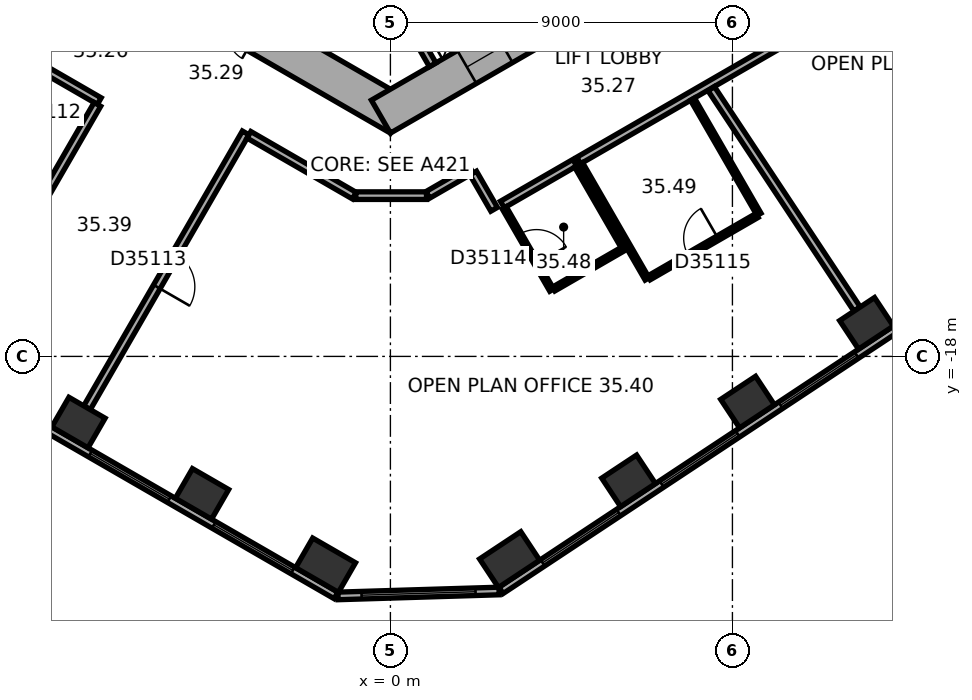
"""IFC4 building model, lengths in metres.
Left out: names, types, materials, properties, quantities, classifications, styles, units other than length and angle.
Written with IfcOpenShell. Run it as: python <this file> out.ifc"""

import sys

from ifc_helpers import new_model, si_unit, direction, frame, frame_2d, origin, origin_2d, place, context, subcontext, project, spatial, rectangle, extrude, element, fill, save


model = new_model("IFC4")
c1 = context("Model", 3, precision=1e-05, world=origin(), true_north=direction((0.0, 1.0)))
c2 = subcontext(c1, "Body", "Model", "MODEL_VIEW")
j1 = project(units=[si_unit("LENGTHUNIT", "METRE"), si_unit("PLANEANGLEUNIT", "RADIAN")], contexts=[c1])
p1 = place(None, origin())
s1 = spatial("IfcSite", under=j1, at=p1, CompositionType="ELEMENT")
p2 = place(p1, origin())
s2 = spatial("IfcBuilding", under=s1, at=p2, CompositionType="ELEMENT")
p3 = place(p2, frame((0.0, 0.0, 146.6)))
s3 = spatial("IfcBuildingStorey", under=s2, at=p3, CompositionType="ELEMENT", Elevation=146.6)
for number, where, z_axis, x_axis in (
    (1, (-8.208, -19.74, 0.0), (0.0, 0.0, 1.0), (0.866, -0.5, 0.0)),
    (2, (-4.958, -21.617, 0.0), (0.0, 0.0, 1.0), (0.866, -0.5, 0.0)),
):
    element("IfcColumn", number, at=place(p3, frame(where, z_axis=z_axis, x_axis=x_axis)), inside=s3, PredefinedType="COLUMN", context=c2, shape_type="SweptSolid", body=[
        extrude(rectangle(XDim=1.1, YDim=0.9, at=origin_2d()), origin(), (0.0, 0.0, 1.0), 3.7),
    ])
for number, where, z_axis, x_axis in (
    (3, (-1.706, -23.494, 0.0), (0.0, 0.0, 1.0), (0.866, -0.5, 0.0)),
    (4, (3.137, -23.346, 0.0), (0.0, 0.0, 1.0), (0.834, 0.552, 0.0)),
):
    element("IfcColumn", number, at=place(p3, frame(where, z_axis=z_axis, x_axis=x_axis)), inside=s3, PredefinedType="COLUMN", context=c2, shape_type="SweptSolid", body=[
        extrude(rectangle(XDim=1.3, YDim=0.9, at=origin_2d()), origin(), (0.0, 0.0, 1.0), 3.7),
    ])
for number, where, z_axis, x_axis in (
    (5, (6.268, -21.274, 0.0), (0.0, 0.0, 1.0), (0.834, 0.552, 0.0)),
    (6, (9.398, -19.202, 0.0), (0.0, 0.0, 1.0), (0.834, 0.552, 0.0)),
    (7, (12.529, -17.13, 0.0), (0.0, 0.0, 1.0), (0.834, 0.552, 0.0)),
):
    element("IfcColumn", number, at=place(p3, frame(where, z_axis=z_axis, x_axis=x_axis)), inside=s3, PredefinedType="COLUMN", context=c2, shape_type="SweptSolid", body=[
        extrude(rectangle(XDim=1.1, YDim=0.9, at=origin_2d()), origin(), (0.0, 0.0, 1.0), 3.7),
    ])
p4 = place(p3, frame((-10.25, -5.629, 0.0), z_axis=(0.0, 0.0, 1.0), x_axis=(0.866022616891, -0.50000482701, 0.0)))
e8 = element("IfcWall", 8, at=p4, inside=s3, PredefinedType="SHEAR", context=c2, shape_type="SweptSolid", body=[
    extrude(rectangle(XDim=12.125, YDim=1.0, at=frame_2d((6.062, 0.0))), origin(), (0.0, 0.0, 1.0), 3.7),
])
p5 = place(p4, frame((6.262, 0.0, 0.0)))
e9 = element("IfcOpeningElement", 9, at=p5, cuts=e8, PredefinedType="OPENING", context=c2, shape_type="SweptSolid", body=[
    extrude(rectangle(XDim=1.5, YDim=2.1, at=frame_2d((0.75, 1.05))), frame((0.0, 0.51, 0.0), z_axis=(0.0, -1.0, 0.0), x_axis=(1.0, 0.0, 0.0)), (0.0, 0.0, 1.0), 1.02),
])
p6 = place(p4, frame((1.712, 0.0, 0.0)))
e10 = element("IfcOpeningElement", 10, at=p6, cuts=e8, PredefinedType="OPENING", context=c2, shape_type="SweptSolid", body=[
    extrude(rectangle(XDim=1.1, YDim=2.1, at=frame_2d((0.55, 1.05))), frame((0.0, 0.51, 0.0), z_axis=(0.0, -1.0, 0.0), x_axis=(1.0, 0.0, 0.0)), (0.0, 0.0, 1.0), 1.02),
])
p7 = place(p4, frame((4.312, 0.0, 0.0)))
e11 = element("IfcOpeningElement", 11, at=p7, cuts=e8, PredefinedType="OPENING", context=c2, shape_type="SweptSolid", body=[
    extrude(rectangle(XDim=1.1, YDim=2.1, at=frame_2d((0.55, 1.05))), frame((0.0, 0.51, 0.0), z_axis=(0.0, -1.0, 0.0), x_axis=(1.0, 0.0, 0.0)), (0.0, 0.0, 1.0), 1.02),
])
p8 = place(p3, frame((-0.25, -11.691, 0.0), z_axis=(0.0, 0.0, 1.0), x_axis=(0.866022616891, 0.50000482701, 0.0)))
e12 = element("IfcWall", 12, at=p8, inside=s3, PredefinedType="SHEAR", context=c2, shape_type="SweptSolid", body=[
    extrude(rectangle(XDim=12.125, YDim=1.0, at=frame_2d((6.062, 0.0))), origin(), (0.0, 0.0, 1.0), 3.7),
])
p9 = place(p8, frame((2.612, 0.0, 0.0)))
e13 = element("IfcOpeningElement", 13, at=p9, cuts=e12, PredefinedType="OPENING", context=c2, shape_type="SweptSolid", body=[
    extrude(rectangle(XDim=1.1, YDim=2.1, at=frame_2d((0.55, 1.05))), frame((0.0, 0.51, 0.0), z_axis=(0.0, -1.0, 0.0), x_axis=(1.0, 0.0, 0.0)), (0.0, 0.0, 1.0), 1.02),
])
p10 = place(p8, frame((5.212, 0.0, 0.0)))
e14 = element("IfcOpeningElement", 14, at=p10, cuts=e12, PredefinedType="OPENING", context=c2, shape_type="SweptSolid", body=[
    extrude(rectangle(XDim=1.1, YDim=2.1, at=frame_2d((0.55, 1.05))), frame((0.0, 0.51, 0.0), z_axis=(0.0, -1.0, 0.0), x_axis=(1.0, 0.0, 0.0)), (0.0, 0.0, 1.0), 1.02),
])
p11 = place(p8, frame((7.812, 0.0, 0.0)))
e15 = element("IfcOpeningElement", 15, at=p11, cuts=e12, PredefinedType="OPENING", context=c2, shape_type="SweptSolid", body=[
    extrude(rectangle(XDim=1.1, YDim=2.1, at=frame_2d((0.55, 1.05))), frame((0.0, 0.51, 0.0), z_axis=(0.0, -1.0, 0.0), x_axis=(1.0, 0.0, 0.0)), (0.0, 0.0, 1.0), 1.02),
])
p12 = place(p3, frame((-18.789, -14.267, 0.0), z_axis=(0.0, 0.0, 1.0), x_axis=(0.866023315909, -0.500003616288, 0.0)))
e16 = element("IfcWall", 16, at=p12, inside=s3, PredefinedType="STANDARD", context=c2, shape_type="SweptSolid", body=[
    extrude(rectangle(XDim=20.044, YDim=0.2, at=frame_2d((10.022, 0.0))), origin(), (0.0, 0.0, 1.0), 3.7),
])
p13 = place(p12, frame((1.314, 0.0, 0.9)))
e17 = element("IfcOpeningElement", 17, at=p13, cuts=e16, PredefinedType="OPENING", context=c2, shape_type="SweptSolid", body=[
    extrude(rectangle(XDim=2.4, YDim=2.0, at=frame_2d((1.2, 1.0))), frame((0.0, 0.11, 0.0), z_axis=(0.0, -1.0, 0.0), x_axis=(1.0, 0.0, 0.0)), (0.0, 0.0, 1.0), 0.22),
])
p14 = place(p12, frame((5.069, 0.0, 0.9)))
e18 = element("IfcOpeningElement", 18, at=p14, cuts=e16, PredefinedType="OPENING", context=c2, shape_type="SweptSolid", body=[
    extrude(rectangle(XDim=2.4, YDim=2.0, at=frame_2d((1.2, 1.0))), frame((0.0, 0.11, 0.0), z_axis=(0.0, -1.0, 0.0), x_axis=(1.0, 0.0, 0.0)), (0.0, 0.0, 1.0), 0.22),
])
p15 = place(p12, frame((8.823, 0.0, 0.9)))
e19 = element("IfcOpeningElement", 19, at=p15, cuts=e16, PredefinedType="OPENING", context=c2, shape_type="SweptSolid", body=[
    extrude(rectangle(XDim=2.4, YDim=2.0, at=frame_2d((1.2, 1.0))), frame((0.0, 0.11, 0.0), z_axis=(0.0, -1.0, 0.0), x_axis=(1.0, 0.0, 0.0)), (0.0, 0.0, 1.0), 0.22),
])
p16 = place(p12, frame((12.577, 0.0, 0.9)))
e20 = element("IfcOpeningElement", 20, at=p16, cuts=e16, PredefinedType="OPENING", context=c2, shape_type="SweptSolid", body=[
    extrude(rectangle(XDim=2.4, YDim=2.0, at=frame_2d((1.2, 1.0))), frame((0.0, 0.11, 0.0), z_axis=(0.0, -1.0, 0.0), x_axis=(1.0, 0.0, 0.0)), (0.0, 0.0, 1.0), 0.22),
])
p17 = place(p12, frame((16.331, 0.0, 0.9)))
e21 = element("IfcOpeningElement", 21, at=p17, cuts=e16, PredefinedType="OPENING", context=c2, shape_type="SweptSolid", body=[
    extrude(rectangle(XDim=2.4, YDim=2.0, at=frame_2d((1.2, 1.0))), frame((0.0, 0.11, 0.0), z_axis=(0.0, -1.0, 0.0), x_axis=(1.0, 0.0, 0.0)), (0.0, 0.0, 1.0), 0.22),
])
p18 = place(p3, frame((-1.378, -24.302, 0.0), z_axis=(0.0, 0.0, 1.0), x_axis=(0.999533857267, 0.030529791629, 0.0)))
e22 = element("IfcWall", 22, at=p18, inside=s3, PredefinedType="STANDARD", context=c2, shape_type="SweptSolid", body=[
    extrude(rectangle(XDim=4.238, YDim=0.2, at=frame_2d((2.119, 0.0))), origin(), (0.0, 0.0, 1.0), 3.7),
])
p19 = place(p18, frame((0.619, 0.0, 0.9)))
e23 = element("IfcOpeningElement", 23, at=p19, cuts=e22, PredefinedType="OPENING", context=c2, shape_type="SweptSolid", body=[
    extrude(rectangle(XDim=3.0, YDim=2.0, at=frame_2d((1.5, 1.0))), frame((0.0, 0.11, 0.0), z_axis=(0.0, -1.0, 0.0), x_axis=(1.0, 0.0, 0.0)), (0.0, 0.0, 1.0), 0.22),
])
p20 = place(p3, frame((2.911, -24.156, 0.0), z_axis=(0.0, 0.0, 1.0), x_axis=(0.833882163564, 0.551942512668, 0.0)))
e24 = element("IfcWall", 24, at=p20, inside=s3, PredefinedType="STANDARD", context=c2, shape_type="SweptSolid", body=[
    extrude(rectangle(XDim=20.044, YDim=0.2, at=frame_2d((10.022, 0.0))), origin(), (0.0, 0.0, 1.0), 3.7),
])
p21 = place(p20, frame((1.313, 0.0, 0.9)))
e25 = element("IfcOpeningElement", 25, at=p21, cuts=e24, PredefinedType="OPENING", context=c2, shape_type="SweptSolid", body=[
    extrude(rectangle(XDim=2.4, YDim=2.0, at=frame_2d((1.2, 1.0))), frame((0.0, 0.11, 0.0), z_axis=(0.0, -1.0, 0.0), x_axis=(1.0, 0.0, 0.0)), (0.0, 0.0, 1.0), 0.22),
])
p22 = place(p20, frame((5.067, 0.0, 0.9)))
e26 = element("IfcOpeningElement", 26, at=p22, cuts=e24, PredefinedType="OPENING", context=c2, shape_type="SweptSolid", body=[
    extrude(rectangle(XDim=2.4, YDim=2.0, at=frame_2d((1.2, 1.0))), frame((0.0, 0.11, 0.0), z_axis=(0.0, -1.0, 0.0), x_axis=(1.0, 0.0, 0.0)), (0.0, 0.0, 1.0), 0.22),
])
p23 = place(p20, frame((8.821, 0.0, 0.9)))
e27 = element("IfcOpeningElement", 27, at=p23, cuts=e24, PredefinedType="OPENING", context=c2, shape_type="SweptSolid", body=[
    extrude(rectangle(XDim=2.4, YDim=2.0, at=frame_2d((1.2, 1.0))), frame((0.0, 0.11, 0.0), z_axis=(0.0, -1.0, 0.0), x_axis=(1.0, 0.0, 0.0)), (0.0, 0.0, 1.0), 0.22),
])
p24 = place(p20, frame((12.575, 0.0, 0.9)))
e28 = element("IfcOpeningElement", 28, at=p24, cuts=e24, PredefinedType="OPENING", context=c2, shape_type="SweptSolid", body=[
    extrude(rectangle(XDim=2.4, YDim=2.0, at=frame_2d((1.2, 1.0))), frame((0.0, 0.11, 0.0), z_axis=(0.0, -1.0, 0.0), x_axis=(1.0, 0.0, 0.0)), (0.0, 0.0, 1.0), 0.22),
])
p25 = place(p20, frame((16.329, 0.0, 0.9)))
e29 = element("IfcOpeningElement", 29, at=p25, cuts=e24, PredefinedType="OPENING", context=c2, shape_type="SweptSolid", body=[
    extrude(rectangle(XDim=2.4, YDim=2.0, at=frame_2d((1.2, 1.0))), frame((0.0, 0.11, 0.0), z_axis=(0.0, -1.0, 0.0), x_axis=(1.0, 0.0, 0.0)), (0.0, 0.0, 1.0), 0.22),
])
p26 = place(p3, frame((0.013, -8.422, 0.0), z_axis=(0.0, 0.0, 1.0), x_axis=(0.500077893725, -0.86598042715, 0.0)))
e30 = element("IfcWall", 30, at=p26, inside=s3, PredefinedType="PARTITIONING", context=c2, shape_type="SweptSolid", body=[
    extrude(rectangle(XDim=2.2, YDim=0.2, at=frame_2d((1.1, 0.0))), origin(), (0.0, 0.0, 1.0), 3.42),
])
p27 = place(p3, frame((-11.435, -9.103, 0.0), z_axis=(0.0, 0.0, 1.0), x_axis=(0.866007399799, -0.500031182522, 0.0)))
e31 = element("IfcWall", 31, at=p27, inside=s3, PredefinedType="PARTITIONING", context=c2, shape_type="SweptSolid", body=[
    extrude(rectangle(XDim=4.358, YDim=0.2, at=frame_2d((2.179, 0.0))), origin(), (0.0, 0.0, 1.0), 3.42),
])
p28 = place(p3, frame((-11.235, -17.474, 0.0), z_axis=(0.0, 0.0, 1.0), x_axis=(0.500009260695, 0.866020057054, 0.0)))
e32 = element("IfcWall", 32, at=p28, inside=s3, PredefinedType="PARTITIONING", context=c2, shape_type="SweptSolid", body=[
    extrude(rectangle(XDim=7.049, YDim=0.2, at=frame_2d((3.524, 0.0))), origin(), (0.0, 0.0, 1.0), 2.87),
])
p29 = place(p28, frame((3.024, 0.0, 0.0)))
e33 = element("IfcOpeningElement", 33, at=p29, cuts=e32, PredefinedType="OPENING", context=c2, shape_type="SweptSolid", body=[
    extrude(rectangle(XDim=1.0, YDim=2.1, at=frame_2d((0.5, 1.05))), frame((0.0, 0.11, 0.0), z_axis=(0.0, -1.0, 0.0), x_axis=(1.0, 0.0, 0.0)), (0.0, 0.0, 1.0), 0.22),
])
p30 = place(p3, frame((-7.984, -19.351, 0.0), z_axis=(0.0, 0.0, 1.0), x_axis=(0.500010139422, 0.866019549707, 0.0)))
e34 = element("IfcWall", 34, at=p30, inside=s3, PredefinedType="PARTITIONING", context=c2, shape_type="SweptSolid", body=[
    extrude(rectangle(XDim=8.35, YDim=0.2, at=frame_2d((4.175, 0.0))), origin(), (0.0, 0.0, 1.0), 3.42),
])
p31 = place(p30, frame((3.675, 0.0, 0.0)))
e35 = element("IfcOpeningElement", 35, at=p31, cuts=e34, PredefinedType="OPENING", context=c2, shape_type="SweptSolid", body=[
    extrude(rectangle(XDim=1.0, YDim=2.1, at=frame_2d((0.5, 1.05))), frame((0.0, 0.11, 0.0), z_axis=(0.0, -1.0, 0.0), x_axis=(1.0, 0.0, 0.0)), (0.0, 0.0, 1.0), 0.22),
])
p32 = place(p3, frame((-3.722, -12.169, 0.0), z_axis=(0.0, 0.0, 1.0), x_axis=(0.866033163891, -0.499986558861, 0.0)))
e36 = element("IfcWall", 36, at=p32, inside=s3, PredefinedType="PARTITIONING", context=c2, shape_type="SweptSolid", body=[
    extrude(rectangle(XDim=3.201, YDim=0.2, at=frame_2d((1.6, 0.0))), origin(), (0.0, 0.0, 1.0), 3.42),
])
p33 = place(p3, frame((-0.91, -13.77, 0.0), z_axis=(0.0, 0.0, 1.0), x_axis=(1.0, 0.0, 0.0)))
e37 = element("IfcWall", 37, at=p33, inside=s3, PredefinedType="PARTITIONING", context=c2, shape_type="SweptSolid", body=[
    extrude(rectangle(XDim=1.86, YDim=0.2, at=frame_2d((0.93, 0.0))), origin(), (0.0, 0.0, 1.0), 3.42),
])
p34 = place(p3, frame((0.985, -13.75, 0.0), z_axis=(0.0, 0.0, 1.0), x_axis=(0.866028661061, 0.499994358189, 0.0)))
e38 = element("IfcWall", 38, at=p34, inside=s3, PredefinedType="PARTITIONING", context=c2, shape_type="SweptSolid", body=[
    extrude(rectangle(XDim=1.321, YDim=0.2, at=frame_2d((0.661, 0.0))), origin(), (0.0, 0.0, 1.0), 3.42),
])
p35 = place(p3, frame((2.179, -13.176, 0.0), z_axis=(0.0, 0.0, 1.0), x_axis=(0.499978356969, -0.866037899034, 0.0)))
e39 = element("IfcWall", 39, at=p35, inside=s3, PredefinedType="PARTITIONING", context=c2, shape_type="SweptSolid", body=[
    extrude(rectangle(XDim=1.101, YDim=0.2, at=frame_2d((0.551, 0.0))), origin(), (0.0, 0.0, 1.0), 3.42),
])
p36 = place(p3, frame((2.946, -14.004, 0.0), z_axis=(0.0, 0.0, 1.0), x_axis=(0.866008176907, 0.50002983664, 0.0)))
e40 = element("IfcWall", 40, at=p36, inside=s3, PredefinedType="PARTITIONING", context=c2, shape_type="SweptSolid", body=[
    extrude(rectangle(XDim=2.2, YDim=0.2, at=frame_2d((1.1, 0.0))), origin(), (0.0, 0.0, 1.0), 3.42),
])
p37 = place(p3, frame((4.246, -16.256, 0.0), z_axis=(0.0, 0.0, 1.0), x_axis=(-0.499961950354, 0.866047370643, 0.0)))
e41 = element("IfcWall", 41, at=p37, inside=s3, PredefinedType="PARTITIONING", context=c2, shape_type="SweptSolid", body=[
    extrude(rectangle(XDim=2.5, YDim=0.12, at=frame_2d((1.25, 0.0))), origin(), (0.0, 0.0, 1.0), 3.42),
])
p38 = place(p37, frame((0.8, 0.0, 0.0)))
e42 = element("IfcOpeningElement", 42, at=p38, cuts=e41, PredefinedType="OPENING", context=c2, shape_type="SweptSolid", body=[
    extrude(rectangle(XDim=0.9, YDim=2.1, at=frame_2d((0.45, 1.05))), frame((0.0, 0.07, 0.0), z_axis=(0.0, -1.0, 0.0), x_axis=(1.0, 0.0, 0.0)), (0.0, 0.0, 1.0), 0.14),
])
p39 = place(p3, frame((4.901, -12.991, 0.0), z_axis=(0.0, 0.0, 1.0), x_axis=(0.500004234368, -0.866022959057, 0.0)))
e43 = element("IfcWall", 43, at=p39, inside=s3, PredefinedType="PARTITIONING", context=c2, shape_type="SweptSolid", body=[
    extrude(rectangle(XDim=2.5, YDim=0.12, at=frame_2d((1.25, 0.0))), origin(), (0.0, 0.0, 1.0), 3.42),
])
p40 = place(p3, frame((4.955, -12.844, 0.0), z_axis=(0.0, 0.0, 1.0), x_axis=(0.86602379309, 0.500002789795, 0.0)))
e44 = element("IfcWall", 44, at=p40, inside=s3, PredefinedType="PARTITIONING", context=c2, shape_type="SweptSolid", body=[
    extrude(rectangle(XDim=6.232, YDim=0.2, at=frame_2d((3.116, 0.0))), origin(), (0.0, 0.0, 1.0), 3.42),
])
p41 = place(p3, frame((6.099, -15.186, 0.0), z_axis=(0.0, 0.0, 1.0), x_axis=(-0.866009661879, -0.500027264788, 0.0)))
e45 = element("IfcWall", 45, at=p41, inside=s3, PredefinedType="PARTITIONING", context=c2, shape_type="SweptSolid", body=[
    extrude(rectangle(XDim=2.08, YDim=0.12, at=frame_2d((1.04, 0.0))), origin(), (0.0, 0.0, 1.0), 3.42),
])
for number, where, z_axis, x_axis in (
    (46, (6.755, -15.962, 0.0), (0.0, 0.0, 1.0), (-0.5, 0.866, 0.0)),
    (47, (7.949, -11.231, 0.0), (0.0, 0.0, 1.0), (0.5, -0.866, 0.0)),
):
    element("IfcWall", number, at=place(p3, frame(where, z_axis=z_axis, x_axis=x_axis)), inside=s3, PredefinedType="PARTITIONING", context=c2, shape_type="SweptSolid", body=[
        extrude(rectangle(XDim=3.5, YDim=0.12, at=frame_2d((1.75, 0.0))), origin(), (0.0, 0.0, 1.0), 3.42),
    ])
p42 = place(p3, frame((9.647, -14.292, 0.0), z_axis=(0.0, 0.0, 1.0), x_axis=(-0.866040564224, -0.499973740429, 0.0)))
e48 = element("IfcWall", 48, at=p42, inside=s3, PredefinedType="PARTITIONING", context=c2, shape_type="SweptSolid", body=[
    extrude(rectangle(XDim=3.28, YDim=0.12, at=frame_2d((1.64, 0.0))), origin(), (0.0, 0.0, 1.0), 3.42),
])
p43 = place(p42, frame((1.19, 0.0, 0.0)))
e49 = element("IfcOpeningElement", 49, at=p43, cuts=e48, PredefinedType="OPENING", context=c2, shape_type="SweptSolid", body=[
    extrude(rectangle(XDim=0.9, YDim=2.1, at=frame_2d((0.45, 1.05))), frame((0.0, 0.07, 0.0), z_axis=(0.0, -1.0, 0.0), x_axis=(1.0, 0.0, 0.0)), (0.0, 0.0, 1.0), 0.14),
])
p44 = place(p3, frame((12.281, -16.755, 0.0), z_axis=(0.0, 0.0, 1.0), x_axis=(-0.551925794663, 0.833893228888, 0.0)))
e50 = element("IfcWall", 50, at=p44, inside=s3, PredefinedType="PARTITIONING", context=c2, shape_type="SweptSolid", body=[
    extrude(rectangle(XDim=6.953, YDim=0.2, at=frame_2d((3.476, 0.0))), origin(), (0.0, 0.0, 1.0), 3.42),
])
p45 = place(p16, origin())
e51 = element("IfcWindow", 51, at=p45, inside=s3, PartitioningType="SINGLE_PANEL", PredefinedType="WINDOW", context=c2, shape_type="SweptSolid", body=[
    extrude(rectangle(XDim=2.4, YDim=2.0, at=frame_2d((1.2, 1.0))), frame((0.0, 0.03, 0.0), z_axis=(0.0, -1.0, 0.0), x_axis=(1.0, 0.0, 0.0)), (0.0, 0.0, 1.0), 0.06),
])
fill(e20, e51)
p46 = place(p17, origin())
e52 = element("IfcWindow", 52, at=p46, inside=s3, PartitioningType="SINGLE_PANEL", PredefinedType="WINDOW", context=c2, shape_type="SweptSolid", body=[
    extrude(rectangle(XDim=2.4, YDim=2.0, at=frame_2d((1.2, 1.0))), frame((0.0, 0.03, 0.0), z_axis=(0.0, -1.0, 0.0), x_axis=(1.0, 0.0, 0.0)), (0.0, 0.0, 1.0), 0.06),
])
fill(e21, e52)
p47 = place(p19, origin())
e53 = element("IfcWindow", 53, at=p47, inside=s3, PartitioningType="SINGLE_PANEL", PredefinedType="WINDOW", context=c2, shape_type="SweptSolid", body=[
    extrude(rectangle(XDim=3.0, YDim=2.0, at=frame_2d((1.5, 1.0))), frame((0.0, 0.03, 0.0), z_axis=(0.0, -1.0, 0.0), x_axis=(1.0, 0.0, 0.0)), (0.0, 0.0, 1.0), 0.06),
])
fill(e23, e53)
p48 = place(p21, origin())
e54 = element("IfcWindow", 54, at=p48, inside=s3, PartitioningType="SINGLE_PANEL", PredefinedType="WINDOW", context=c2, shape_type="SweptSolid", body=[
    extrude(rectangle(XDim=2.4, YDim=2.0, at=frame_2d((1.2, 1.0))), frame((0.0, 0.03, 0.0), z_axis=(0.0, -1.0, 0.0), x_axis=(1.0, 0.0, 0.0)), (0.0, 0.0, 1.0), 0.06),
])
fill(e25, e54)
p49 = place(p22, origin())
e55 = element("IfcWindow", 55, at=p49, inside=s3, PartitioningType="SINGLE_PANEL", PredefinedType="WINDOW", context=c2, shape_type="SweptSolid", body=[
    extrude(rectangle(XDim=2.4, YDim=2.0, at=frame_2d((1.2, 1.0))), frame((0.0, 0.03, 0.0), z_axis=(0.0, -1.0, 0.0), x_axis=(1.0, 0.0, 0.0)), (0.0, 0.0, 1.0), 0.06),
])
fill(e26, e55)
p50 = place(p23, origin())
e56 = element("IfcWindow", 56, at=p50, inside=s3, PartitioningType="SINGLE_PANEL", PredefinedType="WINDOW", context=c2, shape_type="SweptSolid", body=[
    extrude(rectangle(XDim=2.4, YDim=2.0, at=frame_2d((1.2, 1.0))), frame((0.0, 0.03, 0.0), z_axis=(0.0, -1.0, 0.0), x_axis=(1.0, 0.0, 0.0)), (0.0, 0.0, 1.0), 0.06),
])
fill(e27, e56)
p51 = place(p9, origin())
e57 = element("IfcDoor", 57, at=p51, inside=s3, OperationType="DOUBLE_DOOR_SLIDING", PredefinedType="DOOR", context=c2, shape_type="SweptSolid", body=[
    extrude(rectangle(XDim=1.1, YDim=2.1, at=frame_2d((0.55, 1.05))), frame((0.0, 0.025, 0.0), z_axis=(0.0, -1.0, 0.0), x_axis=(1.0, 0.0, 0.0)), (0.0, 0.0, 1.0), 0.05),
])
fill(e13, e57)
p52 = place(p31, origin())
e58 = element("IfcDoor", 58, at=p52, inside=s3, OperationType="SINGLE_SWING_LEFT", PredefinedType="DOOR", context=c2, shape_type="SweptSolid", body=[
    extrude(rectangle(XDim=1.0, YDim=2.1, at=frame_2d((0.5, 1.05))), frame((0.0, 0.025, 0.0), z_axis=(0.0, -1.0, 0.0), x_axis=(1.0, 0.0, 0.0)), (0.0, 0.0, 1.0), 0.05),
])
fill(e35, e58)
p53 = place(p38, origin())
e59 = element("IfcDoor", 59, at=p53, inside=s3, OperationType="SINGLE_SWING_LEFT", PredefinedType="DOOR", context=c2, shape_type="SweptSolid", body=[
    extrude(rectangle(XDim=0.9, YDim=2.1, at=frame_2d((0.45, 1.05))), frame((0.0, 0.025, 0.0), z_axis=(0.0, -1.0, 0.0), x_axis=(1.0, 0.0, 0.0)), (0.0, 0.0, 1.0), 0.05),
])
fill(e42, e59)
p54 = place(p43, origin())
e60 = element("IfcDoor", 60, at=p54, inside=s3, OperationType="SINGLE_SWING_LEFT", PredefinedType="DOOR", context=c2, shape_type="SweptSolid", body=[
    extrude(rectangle(XDim=0.9, YDim=2.1, at=frame_2d((0.45, 1.05))), frame((0.0, 0.025, 0.0), z_axis=(0.0, -1.0, 0.0), x_axis=(1.0, 0.0, 0.0)), (0.0, 0.0, 1.0), 0.05),
])
fill(e49, e60)
save(model, sys.argv[1])
